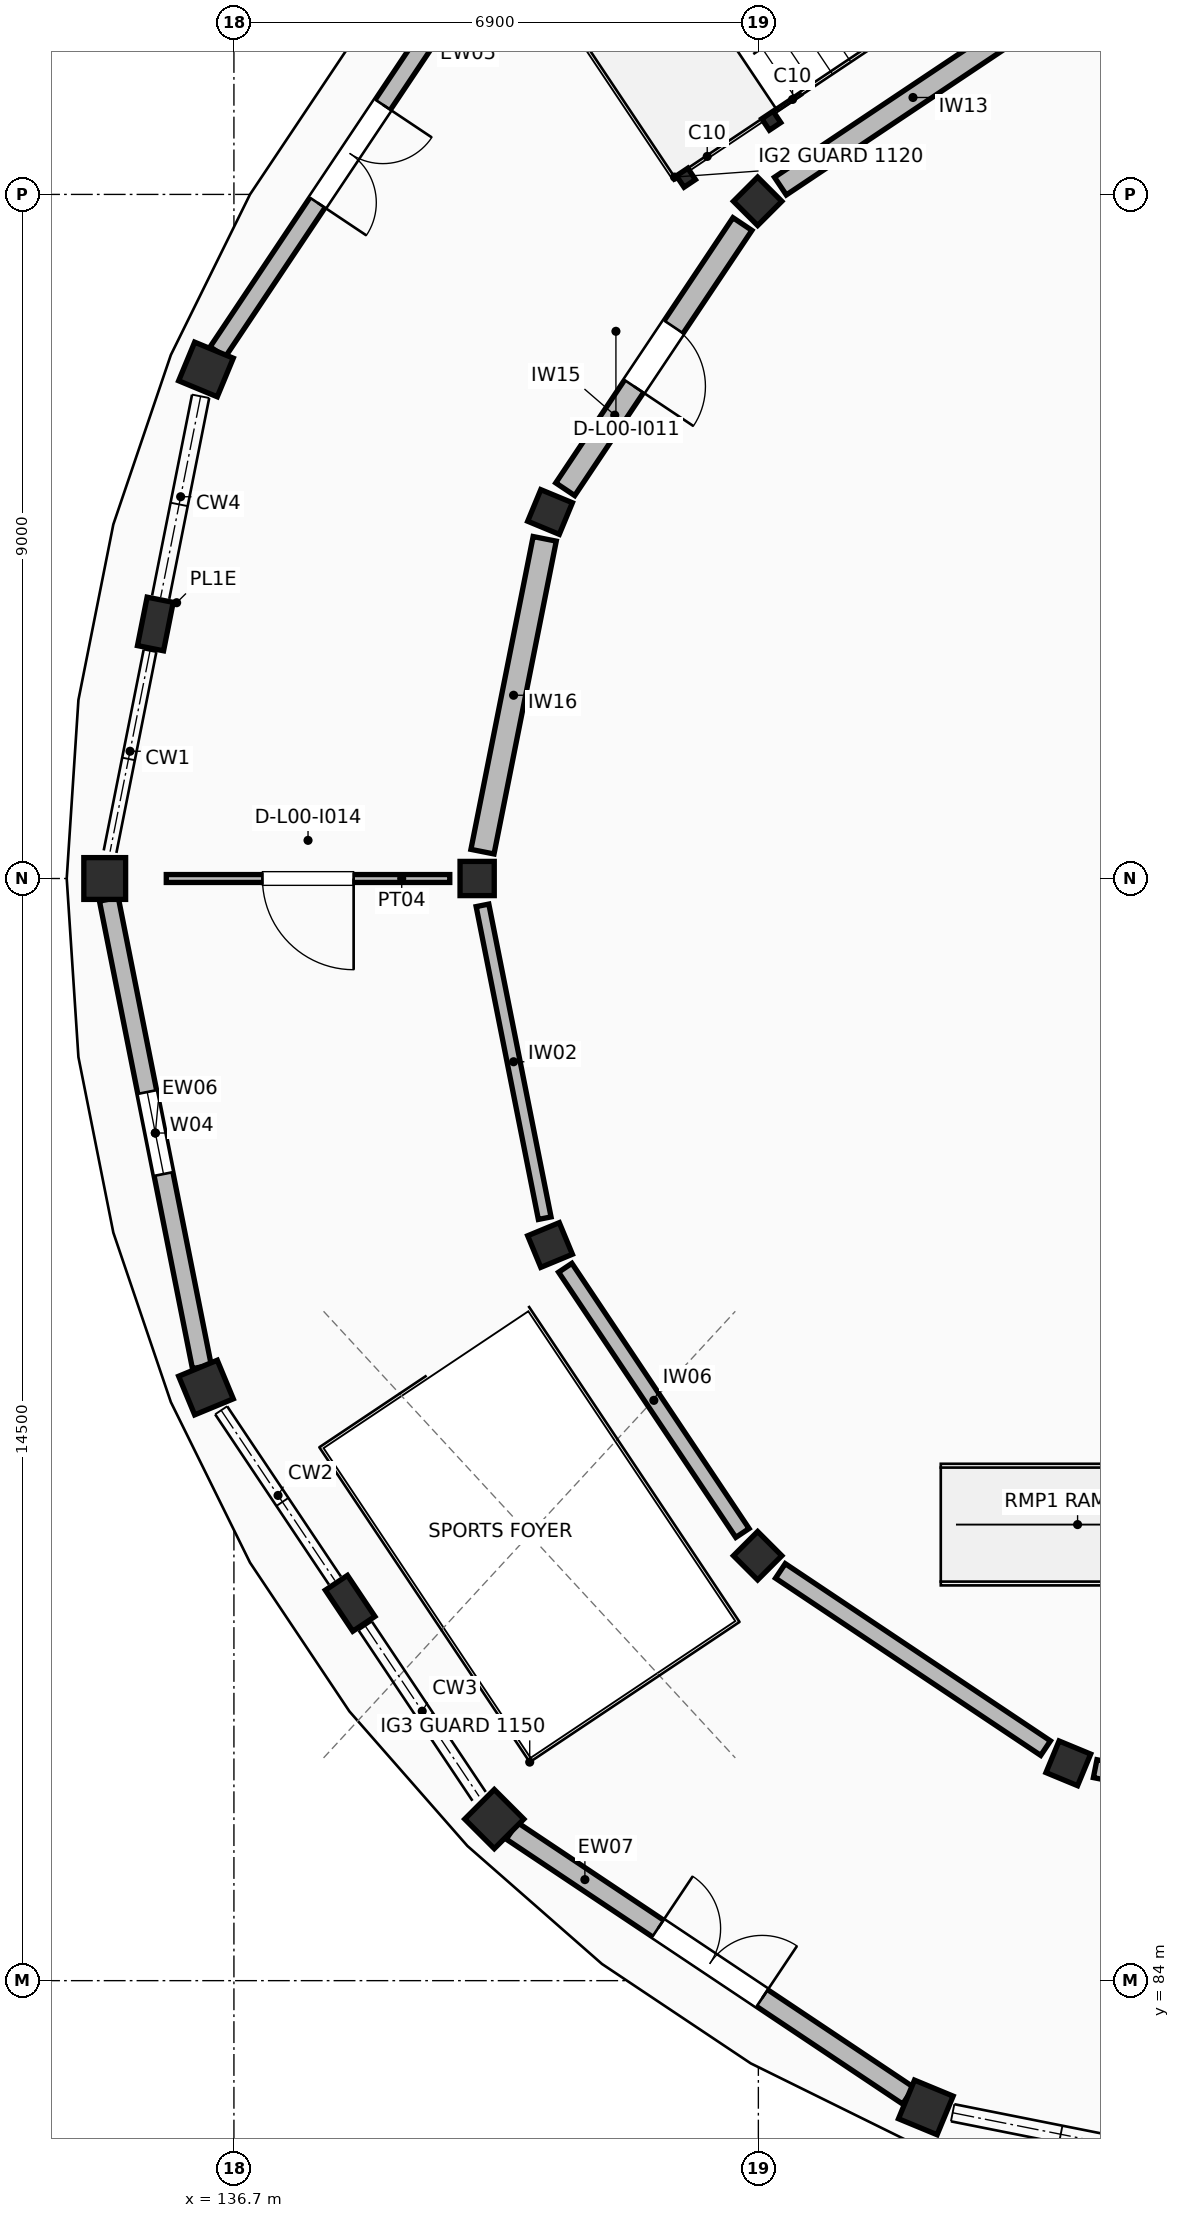
"""IFC4 building model, lengths in metres.
Left out: names, types, materials, properties, quantities, classifications, styles, units other than length and angle.
Written with IfcOpenShell. Run it as: python <this file> out.ifc"""

import sys

from ifc_helpers import new_model, si_unit, direction, frame, frame_2d, origin, origin_2d, place, context, subcontext, project, spatial, rectangle, hollow_rectangle, extrude, element, fill, save


model = new_model("IFC4")
c1 = context("Model", 3, precision=1e-05, world=origin(), true_north=direction((0.0, 1.0)))
c2 = subcontext(c1, "Body", "Model", "MODEL_VIEW")
j1 = project(units=[si_unit("LENGTHUNIT", "METRE"), si_unit("PLANEANGLEUNIT", "RADIAN")], contexts=[c1])
p1 = place(None, origin())
s1 = spatial("IfcSite", under=j1, at=p1, CompositionType="ELEMENT")
p2 = place(p1, origin())
s2 = spatial("IfcBuilding", under=s1, at=p2, CompositionType="ELEMENT")
p3 = place(p2, origin())
s3 = spatial("IfcBuildingStorey", under=s2, at=p3, CompositionType="ELEMENT", Elevation=0.0)
for number, where, z_axis, x_axis in (
    (1, (143.591, 107.409, 0.0), (0.0, 0.0, 1.0), (-0.707, 0.707, 0.0)),
    (2, (140.859, 103.322, 0.0), (0.0, 0.0, 1.0), (-0.924, 0.383, 0.0)),
):
    element("IfcColumn", number, at=place(p3, frame(where, z_axis=z_axis, x_axis=x_axis)), inside=s3, PredefinedType="COLUMN", context=c2, shape_type="SweptSolid", body=[
        extrude(rectangle(XDim=0.45, YDim=0.45, at=origin_2d()), origin(), (0.0, 0.0, 1.0), 4.42),
    ])
p4 = place(p3, frame((136.332, 105.197, 0.0), z_axis=(0.0, 0.0, 1.0), x_axis=(-0.923879532511, 0.382683432365, 0.0)))
e3 = element("IfcColumn", 3, at=p4, inside=s3, PredefinedType="COLUMN", context=c2, shape_type="SweptSolid", body=[
    extrude(rectangle(XDim=0.55, YDim=0.55, at=origin_2d()), origin(), (0.0, 0.0, 1.0), 4.42),
])
p5 = place(p3, frame((139.9, 98.5, 0.0), z_axis=(0.0, 0.0, 1.0), x_axis=(-1.0, 0.0, 0.0)))
e4 = element("IfcColumn", 4, at=p5, inside=s3, PredefinedType="COLUMN", context=c2, shape_type="SweptSolid", body=[
    extrude(rectangle(XDim=0.45, YDim=0.45, at=origin_2d()), origin(), (0.0, 0.0, 1.0), 4.42),
])
p6 = place(p3, frame((135.0, 98.5, 0.0), z_axis=(0.0, 0.0, 1.0), x_axis=(-1.0, 0.0, 0.0)))
e5 = element("IfcColumn", 5, at=p6, inside=s3, PredefinedType="COLUMN", context=c2, shape_type="SweptSolid", body=[
    extrude(rectangle(XDim=0.55, YDim=0.55, at=origin_2d()), origin(), (0.0, 0.0, 1.0), 4.42),
])
p7 = place(p3, frame((140.859, 93.678, 0.0), z_axis=(0.0, 0.0, 1.0), x_axis=(-0.923879532511, -0.382683432365, 0.0)))
e6 = element("IfcColumn", 6, at=p7, inside=s3, PredefinedType="COLUMN", context=c2, shape_type="SweptSolid", body=[
    extrude(rectangle(XDim=0.45, YDim=0.45, at=origin_2d()), origin(), (0.0, 0.0, 1.0), 4.42),
])
p8 = place(p3, frame((136.332, 91.803, 0.0), z_axis=(0.0, 0.0, 1.0), x_axis=(-0.923879532511, -0.382683432365, 0.0)))
e7 = element("IfcColumn", 7, at=p8, inside=s3, PredefinedType="COLUMN", context=c2, shape_type="SweptSolid", body=[
    extrude(rectangle(XDim=0.55, YDim=0.55, at=origin_2d()), origin(), (0.0, 0.0, 1.0), 4.42),
])
p9 = place(p3, frame((143.591, 89.591, 0.0), z_axis=(0.0, 0.0, 1.0), x_axis=(-0.707106781187, -0.707106781187, 0.0)))
e8 = element("IfcColumn", 8, at=p9, inside=s3, PredefinedType="COLUMN", context=c2, shape_type="SweptSolid", body=[
    extrude(rectangle(XDim=0.45, YDim=0.45, at=origin_2d()), origin(), (0.0, 0.0, 1.0), 4.42),
])
p10 = place(p3, frame((140.126, 86.126, 0.0), z_axis=(0.0, 0.0, 1.0), x_axis=(-0.707106781187, -0.707106781187, 0.0)))
e9 = element("IfcColumn", 9, at=p10, inside=s3, PredefinedType="COLUMN", context=c2, shape_type="SweptSolid", body=[
    extrude(rectangle(XDim=0.55, YDim=0.55, at=origin_2d()), origin(), (0.0, 0.0, 1.0), 4.42),
])
p11 = place(p3, frame((147.678, 86.859, 0.0), z_axis=(0.0, 0.0, 1.0), x_axis=(-0.382683432365, -0.923879532511, 0.0)))
e10 = element("IfcColumn", 10, at=p11, inside=s3, PredefinedType="COLUMN", context=c2, shape_type="SweptSolid", body=[
    extrude(rectangle(XDim=0.45, YDim=0.45, at=origin_2d()), origin(), (0.0, 0.0, 1.0), 4.42),
])
p12 = place(p3, frame((145.803, 82.332, 0.0), z_axis=(0.0, 0.0, 1.0), x_axis=(-0.382683432365, -0.923879532511, 0.0)))
e11 = element("IfcColumn", 11, at=p12, inside=s3, PredefinedType="COLUMN", context=c2, shape_type="SweptSolid", body=[
    extrude(rectangle(XDim=0.55, YDim=0.55, at=origin_2d()), origin(), (0.0, 0.0, 1.0), 4.42),
])
for number, where, z_axis, x_axis in (
    (12, (135.666, 101.848, 0.0), (0.0, 0.0, 1.0), (-0.981, 0.195, 0.0)),
    (13, (138.229, 88.964, 0.0), (0.0, 0.0, 1.0), (-0.831, -0.556, 0.0)),
):
    element("IfcColumn", number, at=place(p3, frame(where, z_axis=z_axis, x_axis=x_axis)), inside=s3, PredefinedType="PILASTER", context=c2, shape_type="SweptSolid", body=[
        extrude(rectangle(XDim=0.35, YDim=0.65, at=origin_2d()), origin(), (0.0, 0.0, 1.0), 4.42),
    ])
p13 = place(p3, frame((139.971, 110.643, 0.0), z_axis=(0.0, 0.0, 1.0), x_axis=(-0.555571204893, -0.831468962917, 0.0)))
e14 = element("IfcWall", 14, at=p13, inside=s3, PredefinedType="STANDARD", context=c2, shape_type="SweptSolid", body=[
    extrude(rectangle(XDim=6.272, YDim=0.24, at=frame_2d((3.136, 0.0))), origin(), (0.0, 0.0, 1.0), 3.4),
])
p14 = place(p13, frame((2.361, 0.0, 0.0)))
e15 = element("IfcOpeningElement", 15, at=p14, cuts=e14, PredefinedType="OPENING", context=c2, shape_type="SweptSolid", body=[
    extrude(rectangle(XDim=1.55, YDim=2.22, at=frame_2d((0.775, 1.11))), frame((0.0, 0.13, 0.0), z_axis=(0.0, -1.0, 0.0), x_axis=(1.0, 0.0, 0.0)), (0.0, 0.0, 1.0), 0.26),
])
p15 = place(p3, frame((135.054, 98.227, 0.0), z_axis=(0.0, 0.0, 1.0), x_axis=(0.195090512195, -0.980785242574, 0.0)))
e16 = element("IfcWall", 16, at=p15, inside=s3, PredefinedType="STANDARD", context=c2, shape_type="SweptSolid", body=[
    extrude(rectangle(XDim=6.272, YDim=0.252, at=frame_2d((3.136, 0.0))), origin(), (0.0, 0.0, 1.0), 3.4),
])
p16 = place(p15, frame((2.586, 0.0, 0.95)))
e17 = element("IfcOpeningElement", 17, at=p16, cuts=e16, PredefinedType="OPENING", context=c2, shape_type="SweptSolid", body=[
    extrude(rectangle(XDim=1.1, YDim=1.6, at=frame_2d((0.55, 0.8))), frame((0.0, 0.136, 0.0), z_axis=(0.0, -1.0, 0.0), x_axis=(1.0, 0.0, 0.0)), (0.0, 0.0, 1.0), 0.272),
])
p17 = place(p3, frame((140.357, 85.971, 0.0), z_axis=(0.0, 0.0, 1.0), x_axis=(0.831468962917, -0.555571204893, 0.0)))
e18 = element("IfcWall", 18, at=p17, inside=s3, PredefinedType="STANDARD", context=c2, shape_type="SweptSolid", body=[
    extrude(rectangle(XDim=6.272, YDim=0.264, at=frame_2d((3.136, 0.0))), origin(), (0.0, 0.0, 1.0), 3.4),
])
p18 = place(p17, frame((2.311, 0.0, 0.0)))
e19 = element("IfcOpeningElement", 19, at=p18, cuts=e18, PredefinedType="OPENING", context=c2, shape_type="SweptSolid", body=[
    extrude(rectangle(XDim=1.65, YDim=2.25, at=frame_2d((0.825, 1.125))), frame((0.0, 0.142, 0.0), z_axis=(0.0, -1.0, 0.0), x_axis=(1.0, 0.0, 0.0)), (0.0, 0.0, 1.0), 0.284),
])
for number, where, z_axis, x_axis in (
    (20, (143.77, 108.47, 0.0), (0.0, 0.0, 1.0), (-0.831, -0.556, 0.0)),
    (21, (142.647, 107.72, 0.0), (0.0, 0.0, 1.0), (-0.831, -0.556, 0.0)),
):
    element("IfcColumn", number, at=place(p3, frame(where, z_axis=z_axis, x_axis=x_axis)), inside=s3, PredefinedType="COLUMN", context=c2, shape_type="SweptSolid", body=[
        extrude(hollow_rectangle(XDim=0.18, YDim=0.18, WallThickness=0.01, InnerFilletRadius=0.01, OuterFilletRadius=0.02, at=origin_2d()), origin(), (0.0, 0.0, 1.0), 2.015),
    ])
p19 = place(p3, frame((147.379, 109.941, 0.0), z_axis=(0.0, 0.0, 1.0), x_axis=(-0.831468024304, -0.55557260962, 0.0)))
e22 = element("IfcWall", 22, at=p19, inside=s3, PredefinedType="STANDARD", context=c2, shape_type="SweptSolid", body=[
    extrude(rectangle(XDim=4.196, YDim=0.28, at=frame_2d((2.098, 0.0))), origin(), (0.0, 0.0, 1.0), 3.38),
])
p20 = place(p3, frame((143.39, 107.11, 0.0), z_axis=(0.0, 0.0, 1.0), x_axis=(-0.55557260962, -0.831468024304, 0.0)))
e23 = element("IfcWall", 23, at=p20, inside=s3, PredefinedType="STANDARD", context=c2, shape_type="SweptSolid", body=[
    extrude(rectangle(XDim=4.196, YDim=0.3, at=frame_2d((2.098, 0.0))), origin(), (0.0, 0.0, 1.0), 3.38),
])
p21 = place(p20, frame((1.628, 0.0, 0.0)))
e24 = element("IfcOpeningElement", 24, at=p21, cuts=e23, PredefinedType="OPENING", context=c2, shape_type="SweptSolid", body=[
    extrude(rectangle(XDim=0.94, YDim=2.24, at=frame_2d((0.47, 1.12))), frame((0.0, 0.16, 0.0), z_axis=(0.0, -1.0, 0.0), x_axis=(1.0, 0.0, 0.0)), (0.0, 0.0, 1.0), 0.32),
])
p22 = place(p3, frame((140.789, 102.969, 0.0), z_axis=(0.0, 0.0, 1.0), x_axis=(-0.195075508639, -0.980788226851, 0.0)))
e25 = element("IfcWall", 25, at=p22, inside=s3, PredefinedType="STANDARD", context=c2, shape_type="SweptSolid", body=[
    extrude(rectangle(XDim=4.196, YDim=0.31, at=frame_2d((2.098, 0.0))), origin(), (0.0, 0.0, 1.0), 3.38),
])
p23 = place(p3, frame((139.97, 98.147, 0.0), z_axis=(0.0, 0.0, 1.0), x_axis=(0.195075508639, -0.980788226851, 0.0)))
e26 = element("IfcWall", 26, at=p23, inside=s3, PredefinedType="STANDARD", context=c2, shape_type="SweptSolid", body=[
    extrude(rectangle(XDim=4.196, YDim=0.17, at=frame_2d((2.098, 0.0))), origin(), (0.0, 0.0, 1.0), 3.38),
])
p24 = place(p3, frame((139.54, 98.5, 0.0), z_axis=(0.0, 0.0, 1.0), x_axis=(-1.0, 0.0, 0.0)))
e27 = element("IfcWall", 27, at=p24, inside=s3, PredefinedType="PARTITIONING", context=c2, shape_type="SweptSolid", body=[
    extrude(rectangle(XDim=3.73, YDim=0.104, at=frame_2d((1.865, 0.0))), origin(), (0.0, 0.0, 1.0), 3.38),
])
p25 = place(p24, frame((1.265, 0.0, 0.0)))
e28 = element("IfcOpeningElement", 28, at=p25, cuts=e27, PredefinedType="OPENING", context=c2, shape_type="SweptSolid", body=[
    extrude(rectangle(XDim=1.2, YDim=2.18, at=frame_2d((0.6, 1.09))), frame((0.0, 0.062, 0.0), z_axis=(0.0, -1.0, 0.0), x_axis=(1.0, 0.0, 0.0)), (0.0, 0.0, 1.0), 0.124),
])
p26 = place(p3, frame((141.059, 93.379, 0.0), z_axis=(0.0, 0.0, 1.0), x_axis=(0.55557260962, -0.831468024304, 0.0)))
e29 = element("IfcWall", 29, at=p26, inside=s3, PredefinedType="STANDARD", context=c2, shape_type="SweptSolid", body=[
    extrude(rectangle(XDim=4.196, YDim=0.21, at=frame_2d((2.098, 0.0))), origin(), (0.0, 0.0, 1.0), 3.38),
])
p27 = place(p3, frame((143.89, 89.39, 0.0), z_axis=(0.0, 0.0, 1.0), x_axis=(0.831468024304, -0.55557260962, 0.0)))
e30 = element("IfcWall", 30, at=p27, inside=s3, PredefinedType="STANDARD", context=c2, shape_type="SweptSolid", body=[
    extrude(rectangle(XDim=4.196, YDim=0.23, at=frame_2d((2.098, 0.0))), origin(), (0.0, 0.0, 1.0), 3.38),
])
p28 = place(p3, frame((148.031, 86.789, 0.0), z_axis=(0.0, 0.0, 1.0), x_axis=(0.980788226851, -0.195075508639, 0.0)))
e31 = element("IfcWall", 31, at=p28, inside=s3, PredefinedType="STANDARD", context=c2, shape_type="SweptSolid", body=[
    extrude(rectangle(XDim=4.196, YDim=0.24, at=frame_2d((2.098, 0.0))), origin(), (0.0, 0.0, 1.0), 3.38),
])
p29 = place(p14, frame((1.55, 0.0, 0.0), z_axis=(0.0, 0.0, 1.0), x_axis=(-1.0, 0.0, 0.0)))
e32 = element("IfcDoor", 32, at=p29, inside=s3, OperationType="DOUBLE_DOOR_SINGLE_SWING", PredefinedType="DOOR", context=c2, shape_type="SweptSolid", body=[
    extrude(rectangle(XDim=1.55, YDim=2.22, at=frame_2d((0.775, 1.11))), frame((0.0, 0.025, 0.0), z_axis=(0.0, -1.0, 0.0), x_axis=(1.0, 0.0, 0.0)), (0.0, 0.0, 1.0), 0.05),
])
fill(e15, e32)
p30 = place(p16, origin())
e33 = element("IfcWindow", 33, at=p30, inside=s3, PartitioningType="SINGLE_PANEL", PredefinedType="WINDOW", context=c2, shape_type="SweptSolid", body=[
    extrude(rectangle(XDim=1.1, YDim=1.6, at=frame_2d((0.55, 0.8))), frame((0.0, 0.03, 0.0), z_axis=(0.0, -1.0, 0.0), x_axis=(1.0, 0.0, 0.0)), (0.0, 0.0, 1.0), 0.06),
])
fill(e17, e33)
p31 = place(p18, frame((1.65, 0.0, 0.0), z_axis=(0.0, 0.0, 1.0), x_axis=(-1.0, 0.0, 0.0)))
e34 = element("IfcDoor", 34, at=p31, inside=s3, OperationType="DOUBLE_DOOR_SINGLE_SWING", PredefinedType="DOOR", context=c2, shape_type="SweptSolid", body=[
    extrude(rectangle(XDim=1.65, YDim=2.25, at=frame_2d((0.825, 1.125))), frame((0.0, 0.025, 0.0), z_axis=(0.0, -1.0, 0.0), x_axis=(1.0, 0.0, 0.0)), (0.0, 0.0, 1.0), 0.05),
])
fill(e19, e34)
p32 = place(p21, frame((0.94, 0.0, 0.0), z_axis=(0.0, 0.0, 1.0), x_axis=(-1.0, 0.0, 0.0)))
e35 = element("IfcDoor", 35, at=p32, inside=s3, OperationType="SINGLE_SWING_RIGHT", PredefinedType="DOOR", context=c2, shape_type="SweptSolid", body=[
    extrude(rectangle(XDim=0.94, YDim=2.24, at=frame_2d((0.47, 1.12))), frame((0.0, 0.025, 0.0), z_axis=(0.0, -1.0, 0.0), x_axis=(1.0, 0.0, 0.0)), (0.0, 0.0, 1.0), 0.05),
])
fill(e24, e35)
p33 = place(p25, origin())
e36 = element("IfcDoor", 36, at=p33, inside=s3, OperationType="SINGLE_SWING_LEFT", PredefinedType="DOOR", context=c2, shape_type="SweptSolid", body=[
    extrude(rectangle(XDim=1.2, YDim=2.18, at=frame_2d((0.6, 1.09))), frame((0.0, 0.025, 0.0), z_axis=(0.0, -1.0, 0.0), x_axis=(1.0, 0.0, 0.0)), (0.0, 0.0, 1.0), 0.05),
])
fill(e28, e36)
save(model, sys.argv[1])
